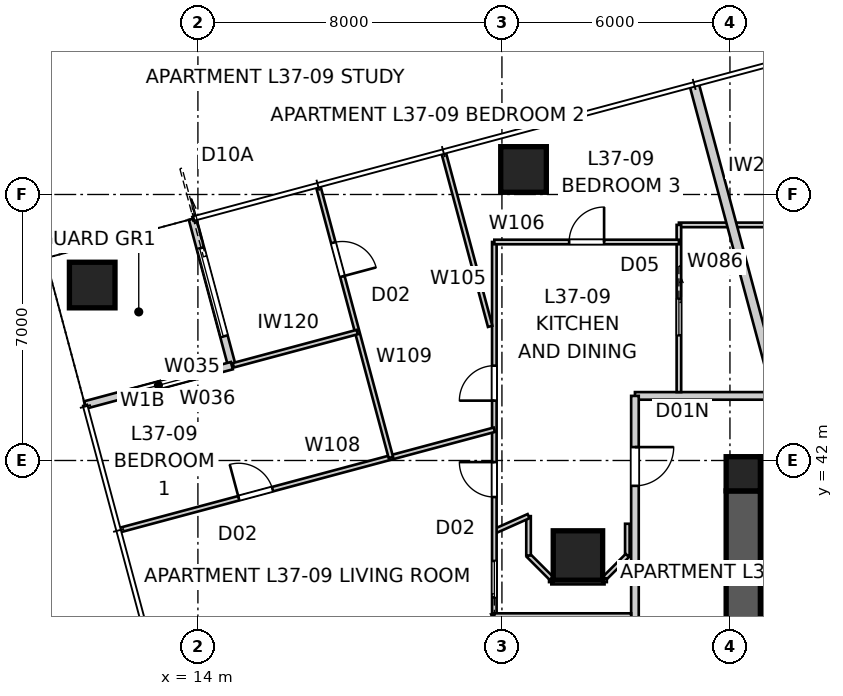
"""IFC4 building model, lengths in metres.
Left out: names, types, materials, properties, quantities, classifications, styles, units other than length and angle.
Written with IfcOpenShell. Run it as: python <this file> out.ifc"""

import sys

from ifc_helpers import new_model, si_unit, direction, frame, frame_2d, origin, origin_2d, place, context, subcontext, project, spatial, polyline, rectangle, outline, extrude, element, fill, save


model = new_model("IFC4")
c1 = context("Model", 3, precision=1e-05, world=origin(), true_north=direction((0.0, 1.0)))
c2 = subcontext(c1, "Body", "Model", "MODEL_VIEW")
j1 = project(units=[si_unit("LENGTHUNIT", "METRE"), si_unit("PLANEANGLEUNIT", "RADIAN")], contexts=[c1])
p1 = place(None, origin())
s1 = spatial("IfcSite", under=j1, at=p1, CompositionType="ELEMENT")
p2 = place(p1, origin())
s2 = spatial("IfcBuilding", under=s1, at=p2, CompositionType="ELEMENT")
p3 = place(p2, frame((0.0, 0.0, 135.4)))
s3 = spatial("IfcBuildingStorey", under=s2, at=p3, CompositionType="ELEMENT", Elevation=135.4)
p4 = place(p3, frame((28.8, 41.65, 0.0), z_axis=(0.0, 0.0, 1.0), x_axis=(1.0, 0.0, 0.0)))
e1 = element("IfcWall", 1, at=p4, inside=s3, PredefinedType="SHEAR", context=c2, shape_type="SweptSolid", body=[
    extrude(outline(polyline([(0.0, -0.45), (22.4, -0.45), (22.4, -0.025), (22.85, -0.025), (22.85, 0.025), (22.4, 0.025), (22.4, 0.45), (0.0, 0.45), (0.0, 0.025), (-0.45, 0.025), (-0.45, -0.025), (0.0, -0.025), (0.0, -0.45)])), origin(), (0.0, 0.0, 1.0), 3.4),
])
p5 = place(p3, frame((28.35, 41.2, 0.0), z_axis=(0.0, 0.0, 1.0), x_axis=(0.0, -1.0, 0.0)))
e2 = element("IfcWall", 2, at=p5, inside=s3, PredefinedType="SHEAR", context=c2, shape_type="SweptSolid", body=[
    extrude(outline(polyline([(0.0, -0.45), (22.4, -0.45), (22.4, -0.025), (22.85, -0.025), (22.85, 0.025), (22.4, 0.025), (22.4, 0.45), (0.0, 0.45), (0.0, 0.025), (-0.45, 0.025), (-0.45, -0.025), (0.0, -0.025), (0.0, -0.45)])), origin(), (0.0, 0.0, 1.0), 3.4),
])
p6 = place(p5, frame((11.14, 0.0, 0.0)))
e3 = element("IfcOpeningElement", 3, at=p6, cuts=e2, PredefinedType="OPENING", context=c2, shape_type="SweptSolid", body=[
    extrude(rectangle(XDim=1.02, YDim=2.4, at=frame_2d((0.51, 1.2))), frame((0.0, 0.46, 0.0), z_axis=(0.0, -1.0, 0.0), x_axis=(1.0, 0.0, 0.0)), (0.0, 0.0, 1.0), 0.92),
])
p7 = place(p3, frame((28.8, 39.75, 0.0), z_axis=(0.0, 0.0, 1.0), x_axis=(1.0, 0.0, 0.0)))
e4 = element("IfcWall", 4, at=p7, inside=s3, PredefinedType="SHEAR", context=c2, shape_type="SweptSolid", body=[
    extrude(rectangle(XDim=3.5, YDim=0.3, at=frame_2d((1.75, 0.0))), origin(), (0.0, 0.0, 1.0), 3.4),
])
p8 = place(p3, frame((28.35, 41.65, 0.0), z_axis=(0.0, 0.0, 1.0), x_axis=(1.0, 0.0, 0.0)))
e5 = element("IfcColumn", 5, at=p8, inside=s3, PredefinedType="COLUMN", context=c2, shape_type="SweptSolid", body=[
    extrude(rectangle(XDim=0.9, YDim=0.9, at=origin_2d()), origin(), (0.0, 0.0, 1.0), 3.4),
])
for number, where, z_axis, x_axis in (
    (6, (22.568, 49.658, 0.0), (0.0, 0.0, 1.0), (1.0, 0.0, 0.0)),
    (7, (11.219, 46.617, 0.0), (0.0, 0.0, 1.0), (1.0, 0.0, 0.0)),
):
    element("IfcColumn", number, at=place(p3, frame(where, z_axis=z_axis, x_axis=x_axis)), inside=s3, PredefinedType="COLUMN", context=c2, shape_type="SweptSolid", body=[
        extrude(rectangle(XDim=1.2, YDim=1.2, at=origin_2d()), origin(), (0.0, 0.0, 1.0), 3.2),
    ])
p9 = place(p3, frame((24.0, 39.5, 0.0), z_axis=(0.0, 0.0, 1.0), x_axis=(1.0, 0.0, 0.0)))
e8 = element("IfcColumn", 8, at=p9, inside=s3, PredefinedType="COLUMN", context=c2, shape_type="SweptSolid", body=[
    extrude(rectangle(XDim=1.3, YDim=1.3, at=origin_2d()), origin(), (0.0, 0.0, 1.0), 3.4),
])
p10 = place(p3, frame((13.857, 48.359, 0.0), z_axis=(0.0, 0.0, 1.0), x_axis=(0.258843877716, -0.965919172068, 0.0)))
e9 = element("IfcWall", 9, at=p10, inside=s3, PredefinedType="SOLIDWALL", context=c2, shape_type="SweptSolid", body=[
    extrude(rectangle(XDim=4.0, YDim=0.2, at=frame_2d((2.0, 0.0))), origin(), (0.0, 0.0, 1.0), 3.2),
])
p11 = place(p10, frame((0.8, 0.0, 0.0)))
e10 = element("IfcOpeningElement", 10, at=p11, cuts=e9, PredefinedType="OPENING", context=c2, shape_type="SweptSolid", body=[
    extrude(rectangle(XDim=2.4, YDim=2.1, at=frame_2d((1.2, 1.05))), frame((0.0, 0.11, 0.0), z_axis=(0.0, -1.0, 0.0), x_axis=(1.0, 0.0, 0.0)), (0.0, 0.0, 1.0), 0.22),
])
p12 = place(p3, frame((14.893, 44.496, 0.0), z_axis=(0.0, 0.0, 1.0), x_axis=(-0.965934430412, -0.258786931944, 0.0)))
e11 = element("IfcWall", 11, at=p12, inside=s3, PredefinedType="SOLIDWALL", context=c2, shape_type="SweptSolid", body=[
    extrude(rectangle(XDim=4.0, YDim=0.2, at=frame_2d((2.0, 0.0))), origin(), (0.0, 0.0, 1.0), 3.2),
])
p13 = place(p12, frame((1.0, 0.0, 0.4)))
e12 = element("IfcOpeningElement", 12, at=p13, cuts=e11, PredefinedType="OPENING", context=c2, shape_type="SweptSolid", body=[
    extrude(rectangle(XDim=2.0, YDim=1.8, at=frame_2d((1.0, 0.9))), frame((0.0, 0.11, 0.0), z_axis=(0.0, -1.0, 0.0), x_axis=(1.0, 0.0, 0.0)), (0.0, 0.0, 1.0), 0.22),
])
p14 = place(p3, frame((54.5, 43.7, 0.0), z_axis=(0.0, 0.0, 1.0), x_axis=(-1.0, 0.0, 0.0)))
e13 = element("IfcWall", 13, at=p14, inside=s3, PredefinedType="PARTITIONING", context=c2, shape_type="SweptSolid", body=[
    extrude(rectangle(XDim=29.0, YDim=0.2, at=frame_2d((14.5, 0.0))), origin(), (0.0, 0.0, 1.0), 3.2),
])
p15 = place(p14, frame((12.852, 0.0, 0.0)))
e14 = element("IfcOpeningElement", 14, at=p15, cuts=e13, PredefinedType="OPENING", context=c2, shape_type="SweptSolid", body=[
    extrude(rectangle(XDim=1.02, YDim=2.34, at=frame_2d((0.51, 1.17))), frame((0.0, 0.11, 0.0), z_axis=(0.0, -1.0, 0.0), x_axis=(1.0, 0.0, 0.0)), (0.0, 0.0, 1.0), 0.22),
])
p16 = place(p14, frame((5.529, 0.0, 0.0)))
e15 = element("IfcOpeningElement", 15, at=p16, cuts=e13, PredefinedType="OPENING", context=c2, shape_type="SweptSolid", body=[
    extrude(rectangle(XDim=1.02, YDim=2.34, at=frame_2d((0.51, 1.17))), frame((0.0, 0.11, 0.0), z_axis=(0.0, -1.0, 0.0), x_axis=(1.0, 0.0, 0.0)), (0.0, 0.0, 1.0), 0.22),
])
p17 = place(p3, frame((25.5, 43.7, 0.0), z_axis=(0.0, 0.0, 1.0), x_axis=(0.0, -1.0, 0.0)))
e16 = element("IfcWall", 16, at=p17, inside=s3, PredefinedType="PARTITIONING", context=c2, shape_type="SweptSolid", body=[
    extrude(rectangle(XDim=28.2, YDim=0.2, at=frame_2d((14.1, 0.0))), origin(), (0.0, 0.0, 1.0), 3.2),
])
p18 = place(p17, frame((24.646, 0.0, 0.0)))
e17 = element("IfcOpeningElement", 17, at=p18, cuts=e16, PredefinedType="OPENING", context=c2, shape_type="SweptSolid", body=[
    extrude(rectangle(XDim=1.02, YDim=2.0, at=frame_2d((0.51, 1.0))), frame((0.0, 0.11, 0.0), z_axis=(0.0, -1.0, 0.0), x_axis=(1.0, 0.0, 0.0)), (0.0, 0.0, 1.0), 0.22),
])
p19 = place(p17, frame((14.858, 0.0, 0.0)))
e18 = element("IfcOpeningElement", 18, at=p19, cuts=e16, PredefinedType="OPENING", context=c2, shape_type="SweptSolid", body=[
    extrude(rectangle(XDim=1.02, YDim=2.34, at=frame_2d((0.51, 1.17))), frame((0.0, 0.11, 0.0), z_axis=(0.0, -1.0, 0.0), x_axis=(1.0, 0.0, 0.0)), (0.0, 0.0, 1.0), 0.22),
])
p20 = place(p17, frame((1.347, 0.0, 0.0)))
e19 = element("IfcOpeningElement", 19, at=p20, cuts=e16, PredefinedType="OPENING", context=c2, shape_type="SweptSolid", body=[
    extrude(rectangle(XDim=1.02, YDim=2.0, at=frame_2d((0.51, 1.0))), frame((0.0, 0.11, 0.0), z_axis=(0.0, -1.0, 0.0), x_axis=(1.0, 0.0, 0.0)), (0.0, 0.0, 1.0), 0.22),
])
p21 = place(p3, frame((27.058, 51.896, 0.0), z_axis=(0.0, 0.0, 1.0), x_axis=(0.258819975199, -0.96592557707, 0.0)))
e20 = element("IfcWall", 20, at=p21, inside=s3, PredefinedType="PARTITIONING", context=c2, shape_type="SweptSolid", body=[
    extrude(rectangle(XDim=8.389, YDim=0.25, at=frame_2d((4.194, 0.0))), origin(), (0.0, 0.0, 1.0), 3.2),
])
p22 = place(p3, frame((26.657, 48.2, 0.0), z_axis=(0.0, 0.0, 1.0), x_axis=(1.0, 0.0, 0.0)))
e21 = element("IfcWall", 21, at=p22, inside=s3, PredefinedType="PARTITIONING", context=c2, shape_type="SweptSolid", body=[
    extrude(rectangle(XDim=31.543, YDim=0.12, at=frame_2d((15.771, 0.0))), origin(), (0.0, 0.0, 1.0), 2.399),
])
p23 = place(p22, frame((13.4, 0.0, 0.0)))
e22 = element("IfcOpeningElement", 22, at=p23, cuts=e21, PredefinedType="OPENING", context=c2, shape_type="SweptSolid", body=[
    extrude(rectangle(XDim=0.92, YDim=2.34, at=frame_2d((0.46, 1.17))), frame((0.0, 0.07, 0.0), z_axis=(0.0, -1.0, 0.0), x_axis=(1.0, 0.0, 0.0)), (0.0, 0.0, 1.0), 0.14),
])
p24 = place(p22, frame((20.723, 0.0, 0.0)))
e23 = element("IfcOpeningElement", 23, at=p24, cuts=e21, PredefinedType="OPENING", context=c2, shape_type="SweptSolid", body=[
    extrude(rectangle(XDim=0.92, YDim=2.34, at=frame_2d((0.46, 1.17))), frame((0.0, 0.07, 0.0), z_axis=(0.0, -1.0, 0.0), x_axis=(1.0, 0.0, 0.0)), (0.0, 0.0, 1.0), 0.14),
])
p25 = place(p22, frame((10.117, 0.0, 0.0)))
e24 = element("IfcOpeningElement", 24, at=p25, cuts=e21, PredefinedType="OPENING", context=c2, shape_type="SweptSolid", body=[
    extrude(rectangle(XDim=0.96, YDim=2.1, at=frame_2d((0.48, 1.05))), frame((0.0, 0.07, 0.0), z_axis=(0.0, -1.0, 0.0), x_axis=(1.0, 0.0, 0.0)), (0.0, 0.0, 1.0), 0.14),
])
p26 = place(p22, frame((28.362, 0.0, 0.0)))
e25 = element("IfcOpeningElement", 25, at=p26, cuts=e21, PredefinedType="OPENING", context=c2, shape_type="SweptSolid", body=[
    extrude(rectangle(XDim=0.92, YDim=2.34, at=frame_2d((0.46, 1.17))), frame((0.0, 0.07, 0.0), z_axis=(0.0, -1.0, 0.0), x_axis=(1.0, 0.0, 0.0)), (0.0, 0.0, 1.0), 0.14),
])
p27 = place(p22, frame((23.375, 0.0, 0.0)))
e26 = element("IfcOpeningElement", 26, at=p27, cuts=e21, PredefinedType="OPENING", context=c2, shape_type="SweptSolid", body=[
    extrude(rectangle(XDim=0.96, YDim=2.1, at=frame_2d((0.48, 1.05))), frame((0.0, 0.07, 0.0), z_axis=(0.0, -1.0, 0.0), x_axis=(1.0, 0.0, 0.0)), (0.0, 0.0, 1.0), 0.14),
])
p28 = place(p3, frame((25.3, 40.335, 0.0), z_axis=(0.0, 0.0, 1.0), x_axis=(0.0, -1.0, 0.0)))
e27 = element("IfcWall", 27, at=p28, inside=s3, PredefinedType="PARTITIONING", context=c2, shape_type="SweptSolid", body=[
    extrude(rectangle(XDim=0.835, YDim=0.12, at=frame_2d((0.417, 0.0))), origin(), (0.0, 0.0, 1.0), 3.2),
])
p29 = place(p3, frame((25.3, 39.5, 0.0), z_axis=(0.0, 0.0, 1.0), x_axis=(-0.707106781187, -0.707106781187, 0.0)))
e28 = element("IfcWall", 28, at=p29, inside=s3, PredefinedType="PARTITIONING", context=c2, shape_type="SweptSolid", body=[
    extrude(rectangle(XDim=0.849, YDim=0.12, at=frame_2d((0.424, 0.0))), origin(), (0.0, 0.0, 1.0), 3.2),
])
p30 = place(p3, frame((24.7, 38.8, 0.0), z_axis=(0.0, 0.0, 1.0), x_axis=(-1.0, 0.0, 0.0)))
e29 = element("IfcWall", 29, at=p30, inside=s3, PredefinedType="PARTITIONING", context=c2, shape_type="SweptSolid", body=[
    extrude(rectangle(XDim=1.4, YDim=0.12, at=frame_2d((0.7, 0.0))), origin(), (0.0, 0.0, 1.0), 2.672),
])
p31 = place(p3, frame((23.3, 38.9, 0.0), z_axis=(0.0, 0.0, 1.0), x_axis=(-0.707106781187, 0.707106781187, 0.0)))
e30 = element("IfcWall", 30, at=p31, inside=s3, PredefinedType="PARTITIONING", context=c2, shape_type="SweptSolid", body=[
    extrude(rectangle(XDim=0.849, YDim=0.12, at=frame_2d((0.424, 0.0))), origin(), (0.0, 0.0, 1.0), 3.2),
])
p32 = place(p3, frame((22.7, 39.5, 0.0), z_axis=(0.0, 0.0, 1.0), x_axis=(0.0, 1.0, 0.0)))
e31 = element("IfcWall", 31, at=p32, inside=s3, PredefinedType="PARTITIONING", context=c2, shape_type="SweptSolid", body=[
    extrude(rectangle(XDim=1.035, YDim=0.12, at=frame_2d((0.518, 0.0))), origin(), (0.0, 0.0, 1.0), 3.2),
])
p33 = place(p3, frame((22.7, 40.535, 0.0), z_axis=(0.0, 0.0, 1.0), x_axis=(-0.913739977195, -0.406299463544, 0.0)))
e32 = element("IfcWall", 32, at=p33, inside=s3, PredefinedType="PARTITIONING", context=c2, shape_type="SweptSolid", body=[
    extrude(rectangle(XDim=0.985, YDim=0.12, at=frame_2d((0.492, 0.0))), origin(), (0.0, 0.0, 1.0), 3.2),
])
p34 = place(p3, frame((21.8, 35.3, 0.0), z_axis=(0.0, 0.0, 1.0), x_axis=(0.0, 1.0, 0.0)))
e33 = element("IfcWall", 33, at=p34, inside=s3, PredefinedType="PARTITIONING", context=c2, shape_type="SweptSolid", body=[
    extrude(rectangle(XDim=12.45, YDim=0.12, at=frame_2d((6.225, 0.0))), origin(), (0.0, 0.0, 1.0), 2.399),
])
p35 = place(p34, frame((5.738, 0.0, 0.0)))
e34 = element("IfcOpeningElement", 34, at=p35, cuts=e33, PredefinedType="OPENING", context=c2, shape_type="SweptSolid", body=[
    extrude(rectangle(XDim=0.92, YDim=2.34, at=frame_2d((0.46, 1.17))), frame((0.0, 0.07, 0.0), z_axis=(0.0, -1.0, 0.0), x_axis=(1.0, 0.0, 0.0)), (0.0, 0.0, 1.0), 0.14),
])
p36 = place(p34, frame((8.275, 0.0, 0.0)))
e35 = element("IfcOpeningElement", 35, at=p36, cuts=e33, PredefinedType="OPENING", context=c2, shape_type="SweptSolid", body=[
    extrude(rectangle(XDim=0.92, YDim=2.34, at=frame_2d((0.46, 1.17))), frame((0.0, 0.07, 0.0), z_axis=(0.0, -1.0, 0.0), x_axis=(1.0, 0.0, 0.0)), (0.0, 0.0, 1.0), 0.14),
])
p37 = place(p34, frame((3.097, 0.0, 0.0)))
e36 = element("IfcOpeningElement", 36, at=p37, cuts=e33, PredefinedType="OPENING", context=c2, shape_type="SweptSolid", body=[
    extrude(rectangle(XDim=0.96, YDim=2.1, at=frame_2d((0.48, 1.05))), frame((0.0, 0.07, 0.0), z_axis=(0.0, -1.0, 0.0), x_axis=(1.0, 0.0, 0.0)), (0.0, 0.0, 1.0), 0.14),
])
p38 = place(p34, frame((1.047, 0.0, 0.0)))
e37 = element("IfcOpeningElement", 37, at=p38, cuts=e33, PredefinedType="OPENING", context=c2, shape_type="SweptSolid", body=[
    extrude(rectangle(XDim=0.96, YDim=2.1, at=frame_2d((0.48, 1.05))), frame((0.0, 0.07, 0.0), z_axis=(0.0, -1.0, 0.0), x_axis=(1.0, 0.0, 0.0)), (0.0, 0.0, 1.0), 0.14),
])
p39 = place(p3, frame((21.8, 47.75, 0.0), z_axis=(0.0, 0.0, 1.0), x_axis=(1.0, 0.0, 0.0)))
e38 = element("IfcWall", 38, at=p39, inside=s3, PredefinedType="PARTITIONING", context=c2, shape_type="SweptSolid", body=[
    extrude(rectangle(XDim=4.857, YDim=0.12, at=frame_2d((2.428, 0.0))), origin(), (0.0, 0.0, 1.0), 3.2),
])
p40 = place(p39, frame((1.969, 0.0, 0.0)))
e39 = element("IfcOpeningElement", 39, at=p40, cuts=e38, PredefinedType="OPENING", context=c2, shape_type="SweptSolid", body=[
    extrude(rectangle(XDim=0.92, YDim=2.34, at=frame_2d((0.46, 1.17))), frame((0.0, 0.07, 0.0), z_axis=(0.0, -1.0, 0.0), x_axis=(1.0, 0.0, 0.0)), (0.0, 0.0, 1.0), 0.14),
])
p41 = place(p3, frame((25.4, 37.918, 0.0), z_axis=(0.0, 0.0, 1.0), x_axis=(-1.0, 0.0, 0.0)))
e40 = element("IfcWall", 40, at=p41, inside=s3, PredefinedType="PARTITIONING", context=c2, shape_type="SweptSolid", body=[
    extrude(rectangle(XDim=3.6, YDim=0.12, at=frame_2d((1.8, 0.0))), origin(), (0.0, 0.0, 1.0), 3.2),
])
p42 = place(p3, frame((11.952, 40.17, 0.0), z_axis=(0.0, 0.0, 1.0), x_axis=(0.965923039694, 0.258829444594, 0.0)))
e41 = element("IfcWall", 41, at=p42, inside=s3, PredefinedType="PARTITIONING", context=c2, shape_type="SweptSolid", body=[
    extrude(rectangle(XDim=10.196, YDim=0.12, at=frame_2d((5.098, 0.0))), origin(), (0.0, 0.0, 1.0), 3.2),
])
p43 = place(p42, frame((3.233, 0.0, 0.0)))
e42 = element("IfcOpeningElement", 42, at=p43, cuts=e41, PredefinedType="OPENING", context=c2, shape_type="SweptSolid", body=[
    extrude(rectangle(XDim=0.92, YDim=2.34, at=frame_2d((0.46, 1.17))), frame((0.0, 0.07, 0.0), z_axis=(0.0, -1.0, 0.0), x_axis=(1.0, 0.0, 0.0)), (0.0, 0.0, 1.0), 0.14),
])
p44 = place(p3, frame((17.168, 49.205, 0.0), z_axis=(0.0, 0.0, 1.0), x_axis=(0.258846923464, -0.965918355874, 0.0)))
e43 = element("IfcWall", 43, at=p44, inside=s3, PredefinedType="PARTITIONING", context=c2, shape_type="SweptSolid", body=[
    extrude(rectangle(XDim=7.377, YDim=0.12, at=frame_2d((3.688, 0.0))), origin(), (0.0, 0.0, 1.0), 3.2),
])
p45 = place(p44, frame((1.525, 0.0, 0.0)))
e44 = element("IfcOpeningElement", 44, at=p45, cuts=e43, PredefinedType="OPENING", context=c2, shape_type="SweptSolid", body=[
    extrude(rectangle(XDim=0.92, YDim=2.34, at=frame_2d((0.46, 1.17))), frame((0.0, 0.07, 0.0), z_axis=(0.0, -1.0, 0.0), x_axis=(1.0, 0.0, 0.0)), (0.0, 0.0, 1.0), 0.14),
])
p46 = place(p3, frame((14.931, 44.506, 0.0), z_axis=(0.0, 0.0, 1.0), x_axis=(0.96593546512, 0.258783069815, 0.0)))
e45 = element("IfcWall", 45, at=p46, inside=s3, PredefinedType="PARTITIONING", context=c2, shape_type="SweptSolid", body=[
    extrude(rectangle(XDim=3.376, YDim=0.12, at=frame_2d((1.688, 0.0))), origin(), (0.0, 0.0, 1.0), 3.2),
])
p47 = place(p3, frame((20.468, 50.089, 0.0), z_axis=(0.0, 0.0, 1.0), x_axis=(0.258808471399, -0.965928659442, 0.0)))
e46 = element("IfcWall", 46, at=p47, inside=s3, PredefinedType="PARTITIONING", context=c2, shape_type="SweptSolid", body=[
    extrude(rectangle(XDim=4.72, YDim=0.12, at=frame_2d((2.36, 0.0))), origin(), (0.0, 0.0, 1.0), 2.399),
])
p48 = place(p3, frame((26.657, 48.2, 0.0), z_axis=(0.0, 0.0, 1.0), x_axis=(0.0, -1.0, 0.0)))
e47 = element("IfcWall", 47, at=p48, inside=s3, PredefinedType="PARTITIONING", context=c2, shape_type="SweptSolid", body=[
    extrude(rectangle(XDim=4.4, YDim=0.12, at=frame_2d((2.2, 0.0))), origin(), (0.0, 0.0, 1.0), 3.2),
])
p49 = place(p48, frame((1.945, 0.0, 0.0)))
e48 = element("IfcOpeningElement", 48, at=p49, cuts=e47, PredefinedType="OPENING", context=c2, shape_type="SweptSolid", body=[
    extrude(rectangle(XDim=0.96, YDim=2.1, at=frame_2d((0.48, 1.05))), frame((0.0, 0.07, 0.0), z_axis=(0.0, -1.0, 0.0), x_axis=(1.0, 0.0, 0.0)), (0.0, 0.0, 1.0), 0.14),
])
for number, where, z_axis, x_axis in (
    (49, (24.7, 38.8, 0.0), (0.0, 0.0, 1.0), (0.0, 1.0, 0.0)),
    (50, (23.3, 38.8, 0.0), (0.0, 0.0, 1.0), (0.0, 1.0, 0.0)),
):
    element("IfcWall", number, at=place(p3, frame(where, z_axis=z_axis, x_axis=x_axis)), inside=s3, PredefinedType="PARTITIONING", context=c2, shape_type="SweptSolid", body=[
        extrude(rectangle(XDim=0.1, YDim=0.12, at=frame_2d((0.05, 0.0))), origin(), (0.0, 0.0, 1.0), 3.2),
    ])
p50 = place(p11, origin())
e51 = element("IfcDoor", 51, at=p50, inside=s3, OperationType="SLIDING_TO_LEFT", PredefinedType="DOOR", context=c2, shape_type="SweptSolid", body=[
    extrude(rectangle(XDim=2.4, YDim=2.1, at=frame_2d((1.2, 1.05))), frame((0.0, 0.025, 0.0), z_axis=(0.0, -1.0, 0.0), x_axis=(1.0, 0.0, 0.0)), (0.0, 0.0, 1.0), 0.05),
])
fill(e10, e51)
p51 = place(p13, origin())
e52 = element("IfcWindow", 52, at=p51, inside=s3, PartitioningType="SINGLE_PANEL", PredefinedType="WINDOW", context=c2, shape_type="SweptSolid", body=[
    extrude(rectangle(XDim=2.0, YDim=1.8, at=frame_2d((1.0, 0.9))), frame((0.0, 0.03, 0.0), z_axis=(0.0, -1.0, 0.0), x_axis=(1.0, 0.0, 0.0)), (0.0, 0.0, 1.0), 0.06),
])
fill(e12, e52)
p52 = place(p20, origin())
e53 = element("IfcDoor", 53, at=p52, inside=s3, OperationType="SINGLE_SWING_LEFT", PredefinedType="DOOR", context=c2, shape_type="SweptSolid", body=[
    extrude(rectangle(XDim=1.02, YDim=2.0, at=frame_2d((0.51, 1.0))), frame((0.0, 0.025, 0.0), z_axis=(0.0, -1.0, 0.0), x_axis=(1.0, 0.0, 0.0)), (0.0, 0.0, 1.0), 0.05),
])
fill(e19, e53)
p53 = place(p40, origin())
e54 = element("IfcDoor", 54, at=p53, inside=s3, OperationType="SINGLE_SWING_RIGHT", PredefinedType="DOOR", context=c2, shape_type="SweptSolid", body=[
    extrude(rectangle(XDim=0.92, YDim=2.34, at=frame_2d((0.46, 1.17))), frame((0.0, 0.025, 0.0), z_axis=(0.0, -1.0, 0.0), x_axis=(1.0, 0.0, 0.0)), (0.0, 0.0, 1.0), 0.05),
])
fill(e39, e54)
p54 = place(p49, origin())
e55 = element("IfcDoor", 55, at=p54, inside=s3, OperationType="SLIDING_TO_LEFT", PredefinedType="DOOR", context=c2, shape_type="SweptSolid", body=[
    extrude(rectangle(XDim=0.96, YDim=2.1, at=frame_2d((0.48, 1.05))), frame((0.0, 0.025, 0.0), z_axis=(0.0, -1.0, 0.0), x_axis=(1.0, 0.0, 0.0)), (0.0, 0.0, 1.0), 0.05),
])
fill(e48, e55)
p55 = place(p35, origin())
e56 = element("IfcDoor", 56, at=p55, inside=s3, OperationType="SINGLE_SWING_RIGHT", PredefinedType="DOOR", context=c2, shape_type="SweptSolid", body=[
    extrude(rectangle(XDim=0.92, YDim=2.34, at=frame_2d((0.46, 1.17))), frame((0.0, 0.025, 0.0), z_axis=(0.0, -1.0, 0.0), x_axis=(1.0, 0.0, 0.0)), (0.0, 0.0, 1.0), 0.05),
])
fill(e34, e56)
p56 = place(p36, origin())
e57 = element("IfcDoor", 57, at=p56, inside=s3, OperationType="SINGLE_SWING_LEFT", PredefinedType="DOOR", context=c2, shape_type="SweptSolid", body=[
    extrude(rectangle(XDim=0.92, YDim=2.34, at=frame_2d((0.46, 1.17))), frame((0.0, 0.025, 0.0), z_axis=(0.0, -1.0, 0.0), x_axis=(1.0, 0.0, 0.0)), (0.0, 0.0, 1.0), 0.05),
])
fill(e35, e57)
p57 = place(p43, origin())
e58 = element("IfcDoor", 58, at=p57, inside=s3, OperationType="SINGLE_SWING_LEFT", PredefinedType="DOOR", context=c2, shape_type="SweptSolid", body=[
    extrude(rectangle(XDim=0.92, YDim=2.34, at=frame_2d((0.46, 1.17))), frame((0.0, 0.025, 0.0), z_axis=(0.0, -1.0, 0.0), x_axis=(1.0, 0.0, 0.0)), (0.0, 0.0, 1.0), 0.05),
])
fill(e42, e58)
p58 = place(p37, origin())
e59 = element("IfcDoor", 59, at=p58, inside=s3, OperationType="SLIDING_TO_LEFT", PredefinedType="DOOR", context=c2, shape_type="SweptSolid", body=[
    extrude(rectangle(XDim=0.96, YDim=2.1, at=frame_2d((0.48, 1.05))), frame((0.0, 0.025, 0.0), z_axis=(0.0, -1.0, 0.0), x_axis=(1.0, 0.0, 0.0)), (0.0, 0.0, 1.0), 0.05),
])
fill(e36, e59)
p59 = place(p45, origin())
e60 = element("IfcDoor", 60, at=p59, inside=s3, OperationType="SINGLE_SWING_RIGHT", PredefinedType="DOOR", context=c2, shape_type="SweptSolid", body=[
    extrude(rectangle(XDim=0.92, YDim=2.34, at=frame_2d((0.46, 1.17))), frame((0.0, 0.025, 0.0), z_axis=(0.0, -1.0, 0.0), x_axis=(1.0, 0.0, 0.0)), (0.0, 0.0, 1.0), 0.05),
])
fill(e44, e60)
save(model, sys.argv[1])
